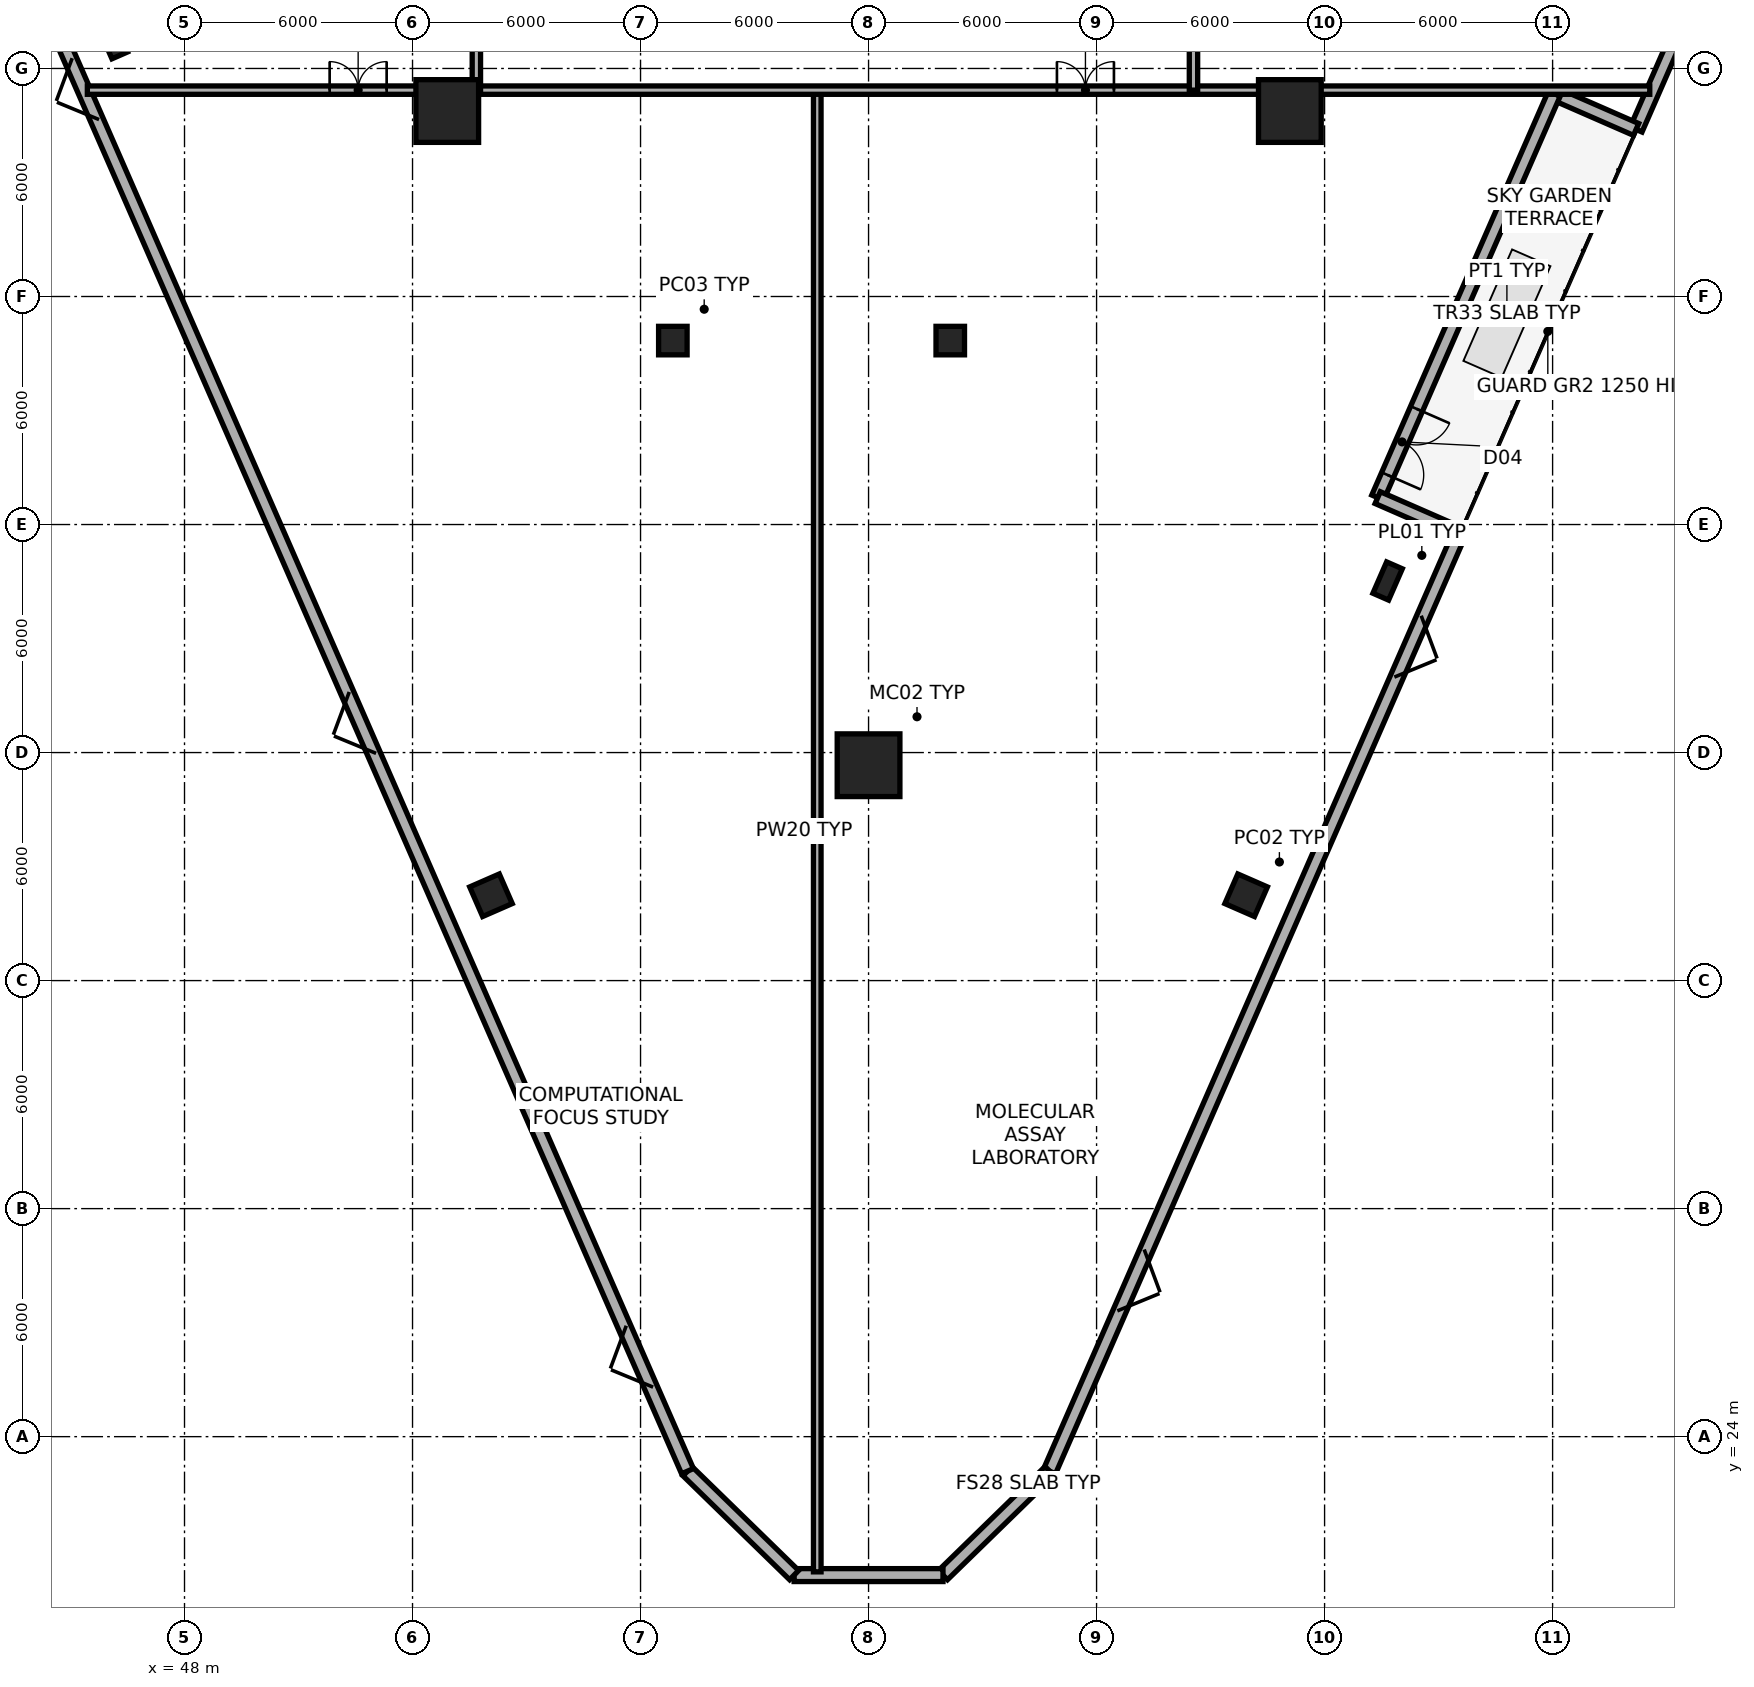
"""IFC4 building model, lengths in metres.
Left out: names, types, materials, properties, quantities, classifications, styles, units other than length and angle.
Written with IfcOpenShell. Run it as: python <this file> out.ifc"""

import sys

from ifc_helpers import new_model, si_unit, direction, frame, frame_2d, origin, origin_2d, place, context, subcontext, project, spatial, rectangle, extrude, element, fill, save


model = new_model("IFC4")
c1 = context("Model", 3, precision=1e-05, world=origin(), true_north=direction((0.0, 1.0)))
c2 = subcontext(c1, "Body", "Model", "MODEL_VIEW")
j1 = project(units=[si_unit("LENGTHUNIT", "METRE"), si_unit("PLANEANGLEUNIT", "RADIAN")], contexts=[c1])
p1 = place(None, origin())
s1 = spatial("IfcSite", under=j1, at=p1, CompositionType="ELEMENT")
p2 = place(p1, origin())
s2 = spatial("IfcBuilding", under=s1, at=p2, CompositionType="ELEMENT")
p3 = place(p2, frame((0.0, 0.0, 96.9)))
s3 = spatial("IfcBuildingStorey", under=s2, at=p3, CompositionType="ELEMENT", Elevation=96.9)
for number, where, z_axis, x_axis in (
    (1, (60.85, 52.84, 0.0), (0.0, 0.0, 1.0), (1.0, 0.0, 0.0)),
    (2, (68.15, 52.84, 0.0), (0.0, 0.0, 1.0), (1.0, 0.0, 0.0)),
):
    element("IfcColumn", number, at=place(p3, frame(where, z_axis=z_axis, x_axis=x_axis)), inside=s3, PredefinedType="COLUMN", context=c2, shape_type="SweptSolid", body=[
        extrude(rectangle(XDim=0.75, YDim=0.75, at=origin_2d()), origin(), (0.0, 0.0, 1.0), 3.65),
    ])
for number, where, z_axis, x_axis in (
    (3, (66.0, 41.667, 0.0), (0.0, 0.0, 1.0), (1.0, 0.0, 0.0)),
    (4, (77.086, 58.88, 0.0), (0.0, 0.0, 1.0), (1.0, 0.0, 0.0)),
    (5, (54.914, 58.88, 0.0), (0.0, 0.0, 1.0), (1.0, 0.0, 0.0)),
):
    element("IfcColumn", number, at=place(p3, frame(where, z_axis=z_axis, x_axis=x_axis)), inside=s3, PredefinedType="COLUMN", context=c2, shape_type="SweptSolid", body=[
        extrude(rectangle(XDim=1.65, YDim=1.65, at=origin_2d()), origin(), (0.0, 0.0, 1.0), 3.65),
    ])
p4 = place(p3, frame((75.958, 38.146, 0.003), z_axis=(-0.012375141264, 0.054450621561, 0.998439775695), x_axis=(-0.18777931012, -0.980877683046, 0.051165433581)))
e6 = element("IfcColumn", 6, at=p4, inside=s3, PredefinedType="COLUMN", context=c2, shape_type="SweptSolid", body=[
    extrude(rectangle(XDim=0.85, YDim=0.85, at=origin_2d()), origin(), (0.0, 0.0, 1.0), 3.65),
])
p5 = place(p3, frame((79.694, 46.444, 0.003), z_axis=(-0.019612004119, 0.038286915892, 0.999074312234), x_axis=(0.060909884258, -0.99736466781, 0.03941706995)))
e7 = element("IfcColumn", 7, at=p5, inside=s3, PredefinedType="PILASTER", context=c2, shape_type="SweptSolid", body=[
    extrude(rectangle(XDim=0.9, YDim=0.45, at=origin_2d()), origin(), (0.0, 0.0, 1.0), 3.647),
])
p6 = place(p3, frame((46.058, 60.738, 0.003), z_axis=(0.032006476949, 0.010512587617, 0.999432374368), x_axis=(0.745076502926, 0.666264296085, -0.030868957717)))
e8 = element("IfcColumn", 8, at=p6, inside=s3, PredefinedType="PILASTER", context=c2, shape_type="SweptSolid", body=[
    extrude(rectangle(XDim=0.9, YDim=0.45, at=origin_2d()), origin(), (0.0, 0.0, 1.0), 3.646),
])
p7 = place(p3, frame((56.042, 38.146, 0.003), z_axis=(0.012375141264, 0.054450621561, 0.998439775695), x_axis=(-0.18777931012, 0.980877683046, -0.051165433581)))
e9 = element("IfcColumn", 9, at=p7, inside=s3, PredefinedType="COLUMN", context=c2, shape_type="SweptSolid", body=[
    extrude(rectangle(XDim=0.85, YDim=0.85, at=origin_2d()), origin(), (0.0, 0.0, 1.0), 3.65),
])
p8 = place(p3, frame((96.984, 83.071, 0.0), z_axis=(0.0, 0.0, 1.0), x_axis=(-0.400539645754, -0.916279429093, 0.0)))
e10 = element("IfcWall", 10, at=p8, inside=s3, PredefinedType="STANDARD", context=c2, shape_type="SweptSolid", body=[
    extrude(rectangle(XDim=26.93, YDim=0.34, at=frame_2d((13.465, 0.0))), origin(), (0.0, 0.0, 1.0), 0.85),
])
p9 = place(p3, frame((86.198, 58.396, 0.0), z_axis=(0.0, 0.0, 1.0), x_axis=(-0.916262209943, 0.400579034188, 0.0)))
e11 = element("IfcWall", 11, at=p9, inside=s3, PredefinedType="STANDARD", context=c2, shape_type="SweptSolid", body=[
    extrude(rectangle(XDim=2.35, YDim=0.34, at=frame_2d((1.175, 0.0))), origin(), (0.0, 0.0, 1.0), 2.505),
])
p10 = place(p3, frame((84.044, 59.337, 0.0), z_axis=(0.0, 0.0, 1.0), x_axis=(-0.400536170639, -0.916280948187, 0.0)))
e12 = element("IfcWall", 12, at=p10, inside=s3, PredefinedType="STANDARD", context=c2, shape_type="SweptSolid", body=[
    extrude(rectangle(XDim=11.6, YDim=0.34, at=frame_2d((5.8, 0.0))), origin(), (0.0, 0.0, 1.0), 2.855),
])
p11 = place(p10, frame((9.05, 0.0, 0.0)))
e13 = element("IfcOpeningElement", 13, at=p11, cuts=e12, PredefinedType="OPENING", context=c2, shape_type="SweptSolid", body=[
    extrude(rectangle(XDim=1.9, YDim=2.3, at=frame_2d((0.95, 1.15))), frame((0.0, 0.18, 0.0), z_axis=(0.0, -1.0, 0.0), x_axis=(1.0, 0.0, 0.0)), (0.0, 0.0, 1.0), 0.36),
])
p12 = place(p3, frame((79.398, 48.708, 0.0), z_axis=(0.0, 0.0, 1.0), x_axis=(0.916245537869, -0.400617166801, 0.0)))
e14 = element("IfcWall", 14, at=p12, inside=s3, PredefinedType="STANDARD", context=c2, shape_type="SweptSolid", body=[
    extrude(rectangle(XDim=2.35, YDim=0.34, at=frame_2d((1.175, 0.0))), origin(), (0.0, 0.0, 1.0), 2.505),
])
p13 = place(p3, frame((81.551, 47.767, 0.0), z_axis=(0.0, 0.0, 1.0), x_axis=(-0.400539645754, -0.916279429093, 0.0)))
e15 = element("IfcWall", 15, at=p13, inside=s3, PredefinedType="STANDARD", context=c2, shape_type="SweptSolid", body=[
    extrude(rectangle(XDim=26.93, YDim=0.34, at=frame_2d((13.465, 0.0))), origin(), (0.0, 0.0, 1.0), 0.85),
])
p14 = place(p3, frame((70.765, 23.092, 0.0), z_axis=(0.0, 0.0, 1.0), x_axis=(-0.716208023847, -0.697886858006, 0.0)))
e16 = element("IfcWall", 16, at=p14, inside=s3, PredefinedType="STANDARD", context=c2, shape_type="SweptSolid", body=[
    extrude(rectangle(XDim=3.918, YDim=0.34, at=frame_2d((1.959, 0.0))), origin(), (0.0, 0.0, 1.0), 3.375),
])
p15 = place(p3, frame((67.959, 20.357, 0.0), z_axis=(0.0, 0.0, 1.0), x_axis=(-1.0, 0.0, 0.0)))
e17 = element("IfcWall", 17, at=p15, inside=s3, PredefinedType="STANDARD", context=c2, shape_type="SweptSolid", body=[
    extrude(rectangle(XDim=3.917, YDim=0.34, at=frame_2d((1.959, 0.0))), origin(), (0.0, 0.0, 1.0), 3.375),
])
p16 = place(p3, frame((64.041, 20.357, 0.0), z_axis=(0.0, 0.0, 1.0), x_axis=(-0.716208023847, 0.697886858006, 0.0)))
e18 = element("IfcWall", 18, at=p16, inside=s3, PredefinedType="STANDARD", context=c2, shape_type="SweptSolid", body=[
    extrude(rectangle(XDim=3.918, YDim=0.34, at=frame_2d((1.959, 0.0))), origin(), (0.0, 0.0, 1.0), 3.375),
])
p17 = place(p3, frame((61.235, 23.092, 0.0), z_axis=(0.0, 0.0, 1.0), x_axis=(-0.400542161224, 0.916278329484, 0.0)))
e19 = element("IfcWall", 19, at=p17, inside=s3, PredefinedType="STANDARD", context=c2, shape_type="SweptSolid", body=[
    extrude(rectangle(XDim=65.459, YDim=0.34, at=frame_2d((32.73, 0.0))), origin(), (0.0, 0.0, 1.0), 0.85),
])
p18 = place(p3, frame((64.65, 20.442, 0.0), z_axis=(0.0, 0.0, 1.0), x_axis=(0.0, 1.0, 0.0)))
e20 = element("IfcWall", 20, at=p18, inside=s3, PredefinedType="PARTITIONING", context=c2, shape_type="SweptSolid", body=[
    extrude(rectangle(XDim=38.988, YDim=0.2, at=frame_2d((19.494, 0.0))), origin(), (0.0, 0.0, 1.0), 2.505),
])
p19 = place(p3, frame((45.443, 59.43, 0.0), z_axis=(0.0, 0.0, 1.0), x_axis=(1.0, 0.0, 0.0)))
e21 = element("IfcWall", 21, at=p19, inside=s3, PredefinedType="PARTITIONING", context=c2, shape_type="SweptSolid", body=[
    extrude(rectangle(XDim=41.114, YDim=0.22, at=frame_2d((20.557, 0.0))), origin(), (0.0, 0.0, 1.0), 2.505),
])
p20 = place(p19, frame((6.376, 0.0, 0.0)))
e22 = element("IfcOpeningElement", 22, at=p20, cuts=e21, PredefinedType="OPENING", context=c2, shape_type="SweptSolid", body=[
    extrude(rectangle(XDim=1.5, YDim=2.2, at=frame_2d((0.75, 1.1))), frame((0.0, 0.12, 0.0), z_axis=(0.0, -1.0, 0.0), x_axis=(1.0, 0.0, 0.0)), (0.0, 0.0, 1.0), 0.24),
])
p21 = place(p19, frame((25.514, 0.0, 0.0)))
e23 = element("IfcOpeningElement", 23, at=p21, cuts=e21, PredefinedType="OPENING", context=c2, shape_type="SweptSolid", body=[
    extrude(rectangle(XDim=1.5, YDim=2.2, at=frame_2d((0.75, 1.1))), frame((0.0, 0.12, 0.0), z_axis=(0.0, -1.0, 0.0), x_axis=(1.0, 0.0, 0.0)), (0.0, 0.0, 1.0), 0.24),
])
p22 = place(p3, frame((55.68, 59.43, 0.0), z_axis=(0.0, 0.0, 1.0), x_axis=(0.0, 1.0, 0.0)))
e24 = element("IfcWall", 24, at=p22, inside=s3, PredefinedType="PARTITIONING", context=c2, shape_type="SweptSolid", body=[
    extrude(rectangle(XDim=18.5, YDim=0.22, at=frame_2d((9.25, 0.0))), origin(), (0.0, 0.0, 1.0), 2.655),
])
p23 = place(p22, frame((2.583, 0.0, 0.0)))
e25 = element("IfcOpeningElement", 25, at=p23, cuts=e24, PredefinedType="OPENING", context=c2, shape_type="SweptSolid", body=[
    extrude(rectangle(XDim=1.0, YDim=2.1, at=frame_2d((0.5, 1.05))), frame((0.0, 0.12, 0.0), z_axis=(0.0, -1.0, 0.0), x_axis=(1.0, 0.0, 0.0)), (0.0, 0.0, 1.0), 0.24),
])
p24 = place(p22, frame((8.75, 0.0, 0.0)))
e26 = element("IfcOpeningElement", 26, at=p24, cuts=e24, PredefinedType="OPENING", context=c2, shape_type="SweptSolid", body=[
    extrude(rectangle(XDim=1.0, YDim=2.1, at=frame_2d((0.5, 1.05))), frame((0.0, 0.12, 0.0), z_axis=(0.0, -1.0, 0.0), x_axis=(1.0, 0.0, 0.0)), (0.0, 0.0, 1.0), 0.24),
])
p25 = place(p22, frame((14.917, 0.0, 0.0)))
e27 = element("IfcOpeningElement", 27, at=p25, cuts=e24, PredefinedType="OPENING", context=c2, shape_type="SweptSolid", body=[
    extrude(rectangle(XDim=1.0, YDim=2.1, at=frame_2d((0.5, 1.05))), frame((0.0, 0.12, 0.0), z_axis=(0.0, -1.0, 0.0), x_axis=(1.0, 0.0, 0.0)), (0.0, 0.0, 1.0), 0.24),
])
p26 = place(p3, frame((74.55, 59.43, 0.0), z_axis=(0.0, 0.0, 1.0), x_axis=(0.0, 1.0, 0.0)))
e28 = element("IfcWall", 28, at=p26, inside=s3, PredefinedType="PARTITIONING", context=c2, shape_type="SweptSolid", body=[
    extrude(rectangle(XDim=1.42, YDim=0.22, at=frame_2d((0.71, 0.0))), origin(), (0.0, 0.0, 1.0), 2.655),
])
p27 = place(p11, origin())
e29 = element("IfcDoor", 29, at=p27, inside=s3, OperationType="DOUBLE_DOOR_SINGLE_SWING", PredefinedType="DOOR", context=c2, shape_type="SweptSolid", body=[
    extrude(rectangle(XDim=1.9, YDim=2.3, at=frame_2d((0.95, 1.15))), frame((0.0, 0.025, 0.0), z_axis=(0.0, -1.0, 0.0), x_axis=(1.0, 0.0, 0.0)), (0.0, 0.0, 1.0), 0.05),
])
fill(e13, e29)
p28 = place(p20, origin())
e30 = element("IfcDoor", 30, at=p28, inside=s3, OperationType="DOUBLE_DOOR_SINGLE_SWING", PredefinedType="DOOR", context=c2, shape_type="SweptSolid", body=[
    extrude(rectangle(XDim=1.5, YDim=2.2, at=frame_2d((0.75, 1.1))), frame((0.0, 0.025, 0.0), z_axis=(0.0, -1.0, 0.0), x_axis=(1.0, 0.0, 0.0)), (0.0, 0.0, 1.0), 0.05),
])
fill(e22, e30)
p29 = place(p21, origin())
e31 = element("IfcDoor", 31, at=p29, inside=s3, OperationType="DOUBLE_DOOR_SINGLE_SWING", PredefinedType="DOOR", context=c2, shape_type="SweptSolid", body=[
    extrude(rectangle(XDim=1.5, YDim=2.2, at=frame_2d((0.75, 1.1))), frame((0.0, 0.025, 0.0), z_axis=(0.0, -1.0, 0.0), x_axis=(1.0, 0.0, 0.0)), (0.0, 0.0, 1.0), 0.05),
])
fill(e23, e31)
save(model, sys.argv[1])
